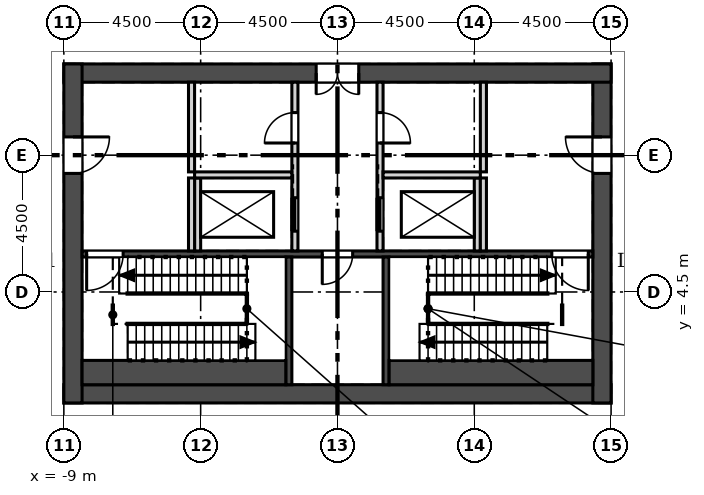
"""IFC4 building model, lengths in metres.
Left out: names, types, materials, properties, quantities, classifications, styles, units other than length and angle.
Written with IfcOpenShell. Run it as: python <this file> out.ifc"""

import sys

from ifc_helpers import new_model, si_unit, direction, frame, frame_2d, origin, place, context, subcontext, project, spatial, rectangle, extrude, element, fill, save


model = new_model("IFC4")
c1 = context("Model", 3, precision=1e-05, world=origin(), true_north=direction((0.0, 1.0)))
c2 = subcontext(c1, "Body", "Model", "MODEL_VIEW")
j1 = project(units=[si_unit("LENGTHUNIT", "METRE"), si_unit("PLANEANGLEUNIT", "RADIAN")], contexts=[c1])
p1 = place(None, origin())
s1 = spatial("IfcSite", under=j1, at=p1, CompositionType="ELEMENT")
p2 = place(p1, origin())
s2 = spatial("IfcBuilding", under=s1, at=p2, CompositionType="ELEMENT")
p3 = place(p2, frame((0.0, 0.0, 350.1)))
s3 = spatial("IfcBuildingStorey", under=s2, at=p3, CompositionType="ELEMENT", Elevation=350.1)
p4 = place(p3, frame((-9.0, 1.15, 0.0), z_axis=(0.0, 0.0, 1.0), x_axis=(1.0, 0.0, 0.0)))
e1 = element("IfcWall", 1, at=p4, inside=s3, PredefinedType="SHEAR", context=c2, shape_type="SweptSolid", body=[
    extrude(rectangle(XDim=18.0, YDim=0.6, at=frame_2d((9.0, 0.0))), origin(), (0.0, 0.0, 1.0), 5.0),
])
p5 = place(p3, frame((8.7, 0.85, 0.0), z_axis=(0.0, 0.0, 1.0), x_axis=(0.0, 1.0, 0.0)))
e2 = element("IfcWall", 2, at=p5, inside=s3, PredefinedType="SHEAR", context=c2, shape_type="SweptSolid", body=[
    extrude(rectangle(XDim=11.15, YDim=0.6, at=frame_2d((5.575, 0.0))), origin(), (0.0, 0.0, 1.0), 5.0),
])
p6 = place(p5, frame((7.55, 0.0, 0.0)))
e3 = element("IfcOpeningElement", 3, at=p6, cuts=e2, PredefinedType="OPENING", context=c2, shape_type="SweptSolid", body=[
    extrude(rectangle(XDim=1.2, YDim=2.1, at=frame_2d((0.6, 1.05))), frame((0.0, 0.31, 0.0), z_axis=(0.0, -1.0, 0.0), x_axis=(1.0, 0.0, 0.0)), (0.0, 0.0, 1.0), 0.62),
])
p7 = place(p3, frame((9.0, 11.7, 0.0), z_axis=(0.0, 0.0, 1.0), x_axis=(-1.0, 0.0, 0.0)))
e4 = element("IfcWall", 4, at=p7, inside=s3, PredefinedType="SHEAR", context=c2, shape_type="SweptSolid", body=[
    extrude(rectangle(XDim=18.0, YDim=0.6, at=frame_2d((9.0, 0.0))), origin(), (0.0, 0.0, 1.0), 5.0),
])
p8 = place(p7, frame((8.3, 0.0, 0.0)))
e5 = element("IfcOpeningElement", 5, at=p8, cuts=e4, PredefinedType="OPENING", context=c2, shape_type="SweptSolid", body=[
    extrude(rectangle(XDim=1.4, YDim=2.1, at=frame_2d((0.7, 1.05))), frame((0.0, 0.31, 0.0), z_axis=(0.0, -1.0, 0.0), x_axis=(1.0, 0.0, 0.0)), (0.0, 0.0, 1.0), 0.62),
])
p9 = place(p3, frame((-8.7, 12.0, 0.0), z_axis=(0.0, 0.0, 1.0), x_axis=(0.0, -1.0, 0.0)))
e6 = element("IfcWall", 6, at=p9, inside=s3, PredefinedType="SHEAR", context=c2, shape_type="SweptSolid", body=[
    extrude(rectangle(XDim=11.15, YDim=0.6, at=frame_2d((5.575, 0.0))), origin(), (0.0, 0.0, 1.0), 5.0),
])
p10 = place(p9, frame((2.4, 0.0, 0.0)))
e7 = element("IfcOpeningElement", 7, at=p10, cuts=e6, PredefinedType="OPENING", context=c2, shape_type="SweptSolid", body=[
    extrude(rectangle(XDim=1.2, YDim=2.1, at=frame_2d((0.6, 1.05))), frame((0.0, 0.31, 0.0), z_axis=(0.0, -1.0, 0.0), x_axis=(1.0, 0.0, 0.0)), (0.0, 0.0, 1.0), 0.62),
])
p11 = place(p3, frame((18.353, 7.709, 0.0), z_axis=(0.0, 0.0, 1.0), x_axis=(-0.499999662836, 0.866025598446, 0.0)))
e8 = element("IfcWall", 8, at=p11, inside=s3, PredefinedType="SOLIDWALL", context=c2, shape_type="SweptSolid", body=[
    extrude(rectangle(XDim=18.5, YDim=0.34, at=frame_2d((9.25, 0.0))), origin(), (0.0, 0.0, 1.0), 4.4),
])
p12 = place(p11, frame((3.5, 0.0, 0.9)))
e9 = element("IfcOpeningElement", 9, at=p12, cuts=e8, PredefinedType="OPENING", context=c2, shape_type="SweptSolid", body=[
    extrude(rectangle(XDim=1.885, YDim=3.0, at=frame_2d((0.942, 1.5))), frame((0.0, 0.18, 0.0), z_axis=(0.0, -1.0, 0.0), x_axis=(1.0, 0.0, 0.0)), (0.0, 0.0, 1.0), 0.36),
])
p13 = place(p11, frame((6.5, 0.0, 0.9)))
e10 = element("IfcOpeningElement", 10, at=p13, cuts=e8, PredefinedType="OPENING", context=c2, shape_type="SweptSolid", body=[
    extrude(rectangle(XDim=1.885, YDim=3.0, at=frame_2d((0.942, 1.5))), frame((0.0, 0.18, 0.0), z_axis=(0.0, -1.0, 0.0), x_axis=(1.0, 0.0, 0.0)), (0.0, 0.0, 1.0), 0.36),
])
p14 = place(p11, frame((9.5, 0.0, 0.9)))
e11 = element("IfcOpeningElement", 11, at=p14, cuts=e8, PredefinedType="OPENING", context=c2, shape_type="SweptSolid", body=[
    extrude(rectangle(XDim=1.885, YDim=3.0, at=frame_2d((0.942, 1.5))), frame((0.0, 0.18, 0.0), z_axis=(0.0, -1.0, 0.0), x_axis=(1.0, 0.0, 0.0)), (0.0, 0.0, 1.0), 0.36),
])
p15 = place(p11, frame((12.5, 0.0, 0.9)))
e12 = element("IfcOpeningElement", 12, at=p15, cuts=e8, PredefinedType="OPENING", context=c2, shape_type="SweptSolid", body=[
    extrude(rectangle(XDim=1.885, YDim=3.0, at=frame_2d((0.942, 1.5))), frame((0.0, 0.18, 0.0), z_axis=(0.0, -1.0, 0.0), x_axis=(1.0, 0.0, 0.0)), (0.0, 0.0, 1.0), 0.36),
])
p16 = place(p11, frame((15.5, 0.0, 0.9)))
e13 = element("IfcOpeningElement", 13, at=p16, cuts=e8, PredefinedType="OPENING", context=c2, shape_type="SweptSolid", body=[
    extrude(rectangle(XDim=1.885, YDim=3.0, at=frame_2d((0.942, 1.5))), frame((0.0, 0.18, 0.0), z_axis=(0.0, -1.0, 0.0), x_axis=(1.0, 0.0, 0.0)), (0.0, 0.0, 1.0), 0.36),
])
p17 = place(p3, frame((-9.045, 23.83, 0.0), z_axis=(0.0, 0.0, 1.0), x_axis=(-0.500004003655, -0.866023092261, 0.0)))
e14 = element("IfcWall", 14, at=p17, inside=s3, PredefinedType="SOLIDWALL", context=c2, shape_type="SweptSolid", body=[
    extrude(rectangle(XDim=18.615, YDim=0.34, at=frame_2d((9.308, 0.0))), origin(), (0.0, 0.0, 1.0), 4.4),
])
p18 = place(p17, frame((1.115, 0.0, 0.9)))
e15 = element("IfcOpeningElement", 15, at=p18, cuts=e14, PredefinedType="OPENING", context=c2, shape_type="SweptSolid", body=[
    extrude(rectangle(XDim=1.885, YDim=3.0, at=frame_2d((0.942, 1.5))), frame((0.0, 0.18, 0.0), z_axis=(0.0, -1.0, 0.0), x_axis=(1.0, 0.0, 0.0)), (0.0, 0.0, 1.0), 0.36),
])
p19 = place(p17, frame((4.115, 0.0, 0.9)))
e16 = element("IfcOpeningElement", 16, at=p19, cuts=e14, PredefinedType="OPENING", context=c2, shape_type="SweptSolid", body=[
    extrude(rectangle(XDim=1.885, YDim=3.0, at=frame_2d((0.942, 1.5))), frame((0.0, 0.18, 0.0), z_axis=(0.0, -1.0, 0.0), x_axis=(1.0, 0.0, 0.0)), (0.0, 0.0, 1.0), 0.36),
])
p20 = place(p17, frame((7.115, 0.0, 0.9)))
e17 = element("IfcOpeningElement", 17, at=p20, cuts=e14, PredefinedType="OPENING", context=c2, shape_type="SweptSolid", body=[
    extrude(rectangle(XDim=1.885, YDim=3.0, at=frame_2d((0.942, 1.5))), frame((0.0, 0.18, 0.0), z_axis=(0.0, -1.0, 0.0), x_axis=(1.0, 0.0, 0.0)), (0.0, 0.0, 1.0), 0.36),
])
p21 = place(p17, frame((10.115, 0.0, 0.9)))
e18 = element("IfcOpeningElement", 18, at=p21, cuts=e14, PredefinedType="OPENING", context=c2, shape_type="SweptSolid", body=[
    extrude(rectangle(XDim=1.885, YDim=3.0, at=frame_2d((0.942, 1.5))), frame((0.0, 0.18, 0.0), z_axis=(0.0, -1.0, 0.0), x_axis=(1.0, 0.0, 0.0)), (0.0, 0.0, 1.0), 0.36),
])
p22 = place(p17, frame((13.115, 0.0, 0.9)))
e19 = element("IfcOpeningElement", 19, at=p22, cuts=e14, PredefinedType="OPENING", context=c2, shape_type="SweptSolid", body=[
    extrude(rectangle(XDim=1.885, YDim=3.0, at=frame_2d((0.942, 1.5))), frame((0.0, 0.18, 0.0), z_axis=(0.0, -1.0, 0.0), x_axis=(1.0, 0.0, 0.0)), (0.0, 0.0, 1.0), 0.36),
])
p23 = place(p3, frame((-8.4, 5.75, -0.6), z_axis=(0.0, 0.0, 1.0), x_axis=(1.0, 0.0, 0.0)))
e20 = element("IfcWall", 20, at=p23, inside=s3, PredefinedType="SOLIDWALL", context=c2, shape_type="SweptSolid", body=[
    extrude(rectangle(XDim=16.8, YDim=0.2, at=frame_2d((8.4, 0.0))), origin(), (0.0, 0.0, 1.0), 5.0),
])
p24 = place(p23, frame((7.9, 0.0, 0.6)))
e21 = element("IfcOpeningElement", 21, at=p24, cuts=e20, PredefinedType="OPENING", context=c2, shape_type="SweptSolid", body=[
    extrude(rectangle(XDim=1.0, YDim=2.1, at=frame_2d((0.5, 1.05))), frame((0.0, 0.11, 0.0), z_axis=(0.0, -1.0, 0.0), x_axis=(1.0, 0.0, 0.0)), (0.0, 0.0, 1.0), 0.22),
])
p25 = place(p23, frame((0.15, 0.0, 0.6)))
e22 = element("IfcOpeningElement", 22, at=p25, cuts=e20, PredefinedType="OPENING", context=c2, shape_type="SweptSolid", body=[
    extrude(rectangle(XDim=1.2, YDim=2.1, at=frame_2d((0.6, 1.05))), frame((0.0, 0.11, 0.0), z_axis=(0.0, -1.0, 0.0), x_axis=(1.0, 0.0, 0.0)), (0.0, 0.0, 1.0), 0.22),
])
p26 = place(p23, frame((15.45, 0.0, 0.6)))
e23 = element("IfcOpeningElement", 23, at=p26, cuts=e20, PredefinedType="OPENING", context=c2, shape_type="SweptSolid", body=[
    extrude(rectangle(XDim=1.2, YDim=2.1, at=frame_2d((0.6, 1.05))), frame((0.0, 0.11, 0.0), z_axis=(0.0, -1.0, 0.0), x_axis=(1.0, 0.0, 0.0)), (0.0, 0.0, 1.0), 0.22),
])
p27 = place(p3, frame((-1.6, 1.45, -0.6), z_axis=(0.0, 0.0, 1.0), x_axis=(0.0, 1.0, 0.0)))
e24 = element("IfcWall", 24, at=p27, inside=s3, PredefinedType="SOLIDWALL", context=c2, shape_type="SweptSolid", body=[
    extrude(rectangle(XDim=4.2, YDim=0.2, at=frame_2d((2.1, 0.0))), origin(), (0.0, 0.0, 1.0), 5.0),
])
p28 = place(p3, frame((-8.4, 1.85, -0.6), z_axis=(0.0, 0.0, 1.0), x_axis=(1.0, 0.0, 0.0)))
e25 = element("IfcWall", 25, at=p28, inside=s3, PredefinedType="SOLIDWALL", context=c2, shape_type="SweptSolid", body=[
    extrude(rectangle(XDim=6.7, YDim=0.8, at=frame_2d((3.35, 0.0))), origin(), (0.0, 0.0, 1.0), 5.0),
])
p29 = place(p3, frame((1.6, 1.45, -0.6), z_axis=(0.0, 0.0, 1.0), x_axis=(0.0, 1.0, 0.0)))
e26 = element("IfcWall", 26, at=p29, inside=s3, PredefinedType="SOLIDWALL", context=c2, shape_type="SweptSolid", body=[
    extrude(rectangle(XDim=4.2, YDim=0.2, at=frame_2d((2.1, 0.0))), origin(), (0.0, 0.0, 1.0), 5.0),
])
p30 = place(p3, frame((1.7, 1.85, -0.6), z_axis=(0.0, 0.0, 1.0), x_axis=(1.0, 0.0, 0.0)))
e27 = element("IfcWall", 27, at=p30, inside=s3, PredefinedType="SOLIDWALL", context=c2, shape_type="SweptSolid", body=[
    extrude(rectangle(XDim=6.7, YDim=0.8, at=frame_2d((3.35, 0.0))), origin(), (0.0, 0.0, 1.0), 5.0),
])
p31 = place(p3, frame((-1.4, 5.85, 0.0), z_axis=(0.0, 0.0, 1.0), x_axis=(0.0, 1.0, 0.0)))
e28 = element("IfcWall", 28, at=p31, inside=s3, PredefinedType="SOLIDWALL", context=c2, shape_type="SweptSolid", body=[
    extrude(rectangle(XDim=5.55, YDim=0.2, at=frame_2d((2.775, 0.0))), origin(), (0.0, 0.0, 1.0), 4.4),
])
p32 = place(p31, frame((0.65, 0.0, 0.0)))
e29 = element("IfcOpeningElement", 29, at=p32, cuts=e28, PredefinedType="OPENING", context=c2, shape_type="SweptSolid", body=[
    extrude(rectangle(XDim=1.1, YDim=2.1, at=frame_2d((0.55, 1.05))), frame((0.0, 0.11, 0.0), z_axis=(0.0, -1.0, 0.0), x_axis=(1.0, 0.0, 0.0)), (0.0, 0.0, 1.0), 0.22),
])
p33 = place(p31, frame((3.55, 0.0, 0.0)))
e30 = element("IfcOpeningElement", 30, at=p33, cuts=e28, PredefinedType="OPENING", context=c2, shape_type="SweptSolid", body=[
    extrude(rectangle(XDim=1.0, YDim=2.1, at=frame_2d((0.5, 1.05))), frame((0.0, 0.11, 0.0), z_axis=(0.0, -1.0, 0.0), x_axis=(1.0, 0.0, 0.0)), (0.0, 0.0, 1.0), 0.22),
])
p34 = place(p3, frame((1.4, 5.85, 0.0), z_axis=(0.0, 0.0, 1.0), x_axis=(0.0, 1.0, 0.0)))
e31 = element("IfcWall", 31, at=p34, inside=s3, PredefinedType="SOLIDWALL", context=c2, shape_type="SweptSolid", body=[
    extrude(rectangle(XDim=5.55, YDim=0.2, at=frame_2d((2.775, 0.0))), origin(), (0.0, 0.0, 1.0), 4.4),
])
p35 = place(p34, frame((0.65, 0.0, 0.0)))
e32 = element("IfcOpeningElement", 32, at=p35, cuts=e31, PredefinedType="OPENING", context=c2, shape_type="SweptSolid", body=[
    extrude(rectangle(XDim=1.1, YDim=2.1, at=frame_2d((0.55, 1.05))), frame((0.0, 0.11, 0.0), z_axis=(0.0, -1.0, 0.0), x_axis=(1.0, 0.0, 0.0)), (0.0, 0.0, 1.0), 0.22),
])
p36 = place(p34, frame((3.55, 0.0, 0.0)))
e33 = element("IfcOpeningElement", 33, at=p36, cuts=e31, PredefinedType="OPENING", context=c2, shape_type="SweptSolid", body=[
    extrude(rectangle(XDim=1.0, YDim=2.1, at=frame_2d((0.5, 1.05))), frame((0.0, 0.11, 0.0), z_axis=(0.0, -1.0, 0.0), x_axis=(1.0, 0.0, 0.0)), (0.0, 0.0, 1.0), 0.22),
])
for number, where, z_axis, x_axis in (
    (34, (-4.6, 5.85, 0.0), (0.0, 0.0, 1.0), (0.0, 1.0, 0.0)),
    (35, (4.6, 5.85, 0.0), (0.0, 0.0, 1.0), (0.0, 1.0, 0.0)),
):
    element("IfcWall", number, at=place(p3, frame(where, z_axis=z_axis, x_axis=x_axis)), inside=s3, PredefinedType="SOLIDWALL", context=c2, shape_type="SweptSolid", body=[
        extrude(rectangle(XDim=2.4, YDim=0.2, at=frame_2d((1.2, 0.0))), origin(), (0.0, 0.0, 1.0), 4.4),
    ])
for number, where, z_axis, x_axis in (
    (36, (-4.7, 8.35, 0.0), (0.0, 0.0, 1.0), (1.0, 0.0, 0.0)),
    (37, (1.5, 8.35, 0.0), (0.0, 0.0, 1.0), (1.0, 0.0, 0.0)),
):
    element("IfcWall", number, at=place(p3, frame(where, z_axis=z_axis, x_axis=x_axis)), inside=s3, PredefinedType="SOLIDWALL", context=c2, shape_type="SweptSolid", body=[
        extrude(rectangle(XDim=3.2, YDim=0.2, at=frame_2d((1.6, 0.0))), origin(), (0.0, 0.0, 1.0), 4.4),
    ])
for number, where, z_axis, x_axis in (
    (38, (-4.8, 8.45, 0.0), (0.0, 0.0, 1.0), (0.0, 1.0, 0.0)),
    (39, (4.8, 8.45, 0.0), (0.0, 0.0, 1.0), (0.0, 1.0, 0.0)),
):
    element("IfcWall", number, at=place(p3, frame(where, z_axis=z_axis, x_axis=x_axis)), inside=s3, PredefinedType="SOLIDWALL", context=c2, shape_type="SweptSolid", body=[
        extrude(rectangle(XDim=2.95, YDim=0.2, at=frame_2d((1.475, 0.0))), origin(), (0.0, 0.0, 1.0), 4.4),
    ])
for number, where, z_axis, x_axis in (
    (40, (-4.8, 5.85, 0.0), (0.0, 0.0, 1.0), (0.0, 1.0, 0.0)),
    (41, (4.8, 5.85, 0.0), (0.0, 0.0, 1.0), (0.0, 1.0, 0.0)),
):
    element("IfcWall", number, at=place(p3, frame(where, z_axis=z_axis, x_axis=x_axis)), inside=s3, PredefinedType="SOLIDWALL", context=c2, shape_type="SweptSolid", body=[
        extrude(rectangle(XDim=2.4, YDim=0.2, at=frame_2d((1.2, 0.0))), origin(), (0.0, 0.0, 1.0), 4.4),
    ])
p37 = place(p32, origin())
e42 = element("IfcDoor", 42, at=p37, inside=s3, OperationType="SLIDING_TO_RIGHT", PredefinedType="DOOR", context=c2, shape_type="SweptSolid", body=[
    extrude(rectangle(XDim=1.1, YDim=2.1, at=frame_2d((0.55, 1.05))), frame((0.0, 0.025, 0.0), z_axis=(0.0, -1.0, 0.0), x_axis=(1.0, 0.0, 0.0)), (0.0, 0.0, 1.0), 0.05),
])
fill(e29, e42)
p38 = place(p35, origin())
e43 = element("IfcDoor", 43, at=p38, inside=s3, OperationType="SLIDING_TO_RIGHT", PredefinedType="DOOR", context=c2, shape_type="SweptSolid", body=[
    extrude(rectangle(XDim=1.1, YDim=2.1, at=frame_2d((0.55, 1.05))), frame((0.0, 0.025, 0.0), z_axis=(0.0, -1.0, 0.0), x_axis=(1.0, 0.0, 0.0)), (0.0, 0.0, 1.0), 0.05),
])
fill(e32, e43)
p39 = place(p24, frame((1.0, 0.0, 0.0), z_axis=(0.0, 0.0, 1.0), x_axis=(-1.0, 0.0, 0.0)))
e44 = element("IfcDoor", 44, at=p39, inside=s3, OperationType="SINGLE_SWING_RIGHT", PredefinedType="DOOR", context=c2, shape_type="SweptSolid", body=[
    extrude(rectangle(XDim=1.0, YDim=2.1, at=frame_2d((0.5, 1.05))), frame((0.0, 0.025, 0.0), z_axis=(0.0, -1.0, 0.0), x_axis=(1.0, 0.0, 0.0)), (0.0, 0.0, 1.0), 0.05),
])
fill(e21, e44)
p40 = place(p10, origin())
e45 = element("IfcDoor", 45, at=p40, inside=s3, OperationType="SINGLE_SWING_LEFT", PredefinedType="DOOR", context=c2, shape_type="SweptSolid", body=[
    extrude(rectangle(XDim=1.2, YDim=2.1, at=frame_2d((0.6, 1.05))), frame((0.0, 0.025, 0.0), z_axis=(0.0, -1.0, 0.0), x_axis=(1.0, 0.0, 0.0)), (0.0, 0.0, 1.0), 0.05),
])
fill(e7, e45)
p41 = place(p25, frame((1.2, 0.0, 0.0), z_axis=(0.0, 0.0, 1.0), x_axis=(-1.0, 0.0, 0.0)))
e46 = element("IfcDoor", 46, at=p41, inside=s3, OperationType="SINGLE_SWING_RIGHT", PredefinedType="DOOR", context=c2, shape_type="SweptSolid", body=[
    extrude(rectangle(XDim=1.2, YDim=2.1, at=frame_2d((0.6, 1.05))), frame((0.0, 0.025, 0.0), z_axis=(0.0, -1.0, 0.0), x_axis=(1.0, 0.0, 0.0)), (0.0, 0.0, 1.0), 0.05),
])
fill(e22, e46)
p42 = place(p33, origin())
e47 = element("IfcDoor", 47, at=p42, inside=s3, OperationType="SINGLE_SWING_LEFT", PredefinedType="DOOR", context=c2, shape_type="SweptSolid", body=[
    extrude(rectangle(XDim=1.0, YDim=2.1, at=frame_2d((0.5, 1.05))), frame((0.0, 0.025, 0.0), z_axis=(0.0, -1.0, 0.0), x_axis=(1.0, 0.0, 0.0)), (0.0, 0.0, 1.0), 0.05),
])
fill(e30, e47)
p43 = place(p6, origin())
e48 = element("IfcDoor", 48, at=p43, inside=s3, OperationType="SINGLE_SWING_RIGHT", PredefinedType="DOOR", context=c2, shape_type="SweptSolid", body=[
    extrude(rectangle(XDim=1.2, YDim=2.1, at=frame_2d((0.6, 1.05))), frame((0.0, 0.025, 0.0), z_axis=(0.0, -1.0, 0.0), x_axis=(1.0, 0.0, 0.0)), (0.0, 0.0, 1.0), 0.05),
])
fill(e3, e48)
p44 = place(p26, frame((1.2, 0.0, 0.0), z_axis=(0.0, 0.0, 1.0), x_axis=(-1.0, 0.0, 0.0)))
e49 = element("IfcDoor", 49, at=p44, inside=s3, OperationType="SINGLE_SWING_LEFT", PredefinedType="DOOR", context=c2, shape_type="SweptSolid", body=[
    extrude(rectangle(XDim=1.2, YDim=2.1, at=frame_2d((0.6, 1.05))), frame((0.0, 0.025, 0.0), z_axis=(0.0, -1.0, 0.0), x_axis=(1.0, 0.0, 0.0)), (0.0, 0.0, 1.0), 0.05),
])
fill(e23, e49)
p45 = place(p36, frame((1.0, 0.0, 0.0), z_axis=(0.0, 0.0, 1.0), x_axis=(-1.0, 0.0, 0.0)))
e50 = element("IfcDoor", 50, at=p45, inside=s3, OperationType="SINGLE_SWING_RIGHT", PredefinedType="DOOR", context=c2, shape_type="SweptSolid", body=[
    extrude(rectangle(XDim=1.0, YDim=2.1, at=frame_2d((0.5, 1.05))), frame((0.0, 0.025, 0.0), z_axis=(0.0, -1.0, 0.0), x_axis=(1.0, 0.0, 0.0)), (0.0, 0.0, 1.0), 0.05),
])
fill(e33, e50)
p46 = place(p8, origin())
e51 = element("IfcDoor", 51, at=p46, inside=s3, OperationType="DOUBLE_DOOR_SINGLE_SWING", PredefinedType="DOOR", context=c2, shape_type="SweptSolid", body=[
    extrude(rectangle(XDim=1.4, YDim=2.1, at=frame_2d((0.7, 1.05))), frame((0.0, 0.025, 0.0), z_axis=(0.0, -1.0, 0.0), x_axis=(1.0, 0.0, 0.0)), (0.0, 0.0, 1.0), 0.05),
])
fill(e5, e51)
save(model, sys.argv[1])
